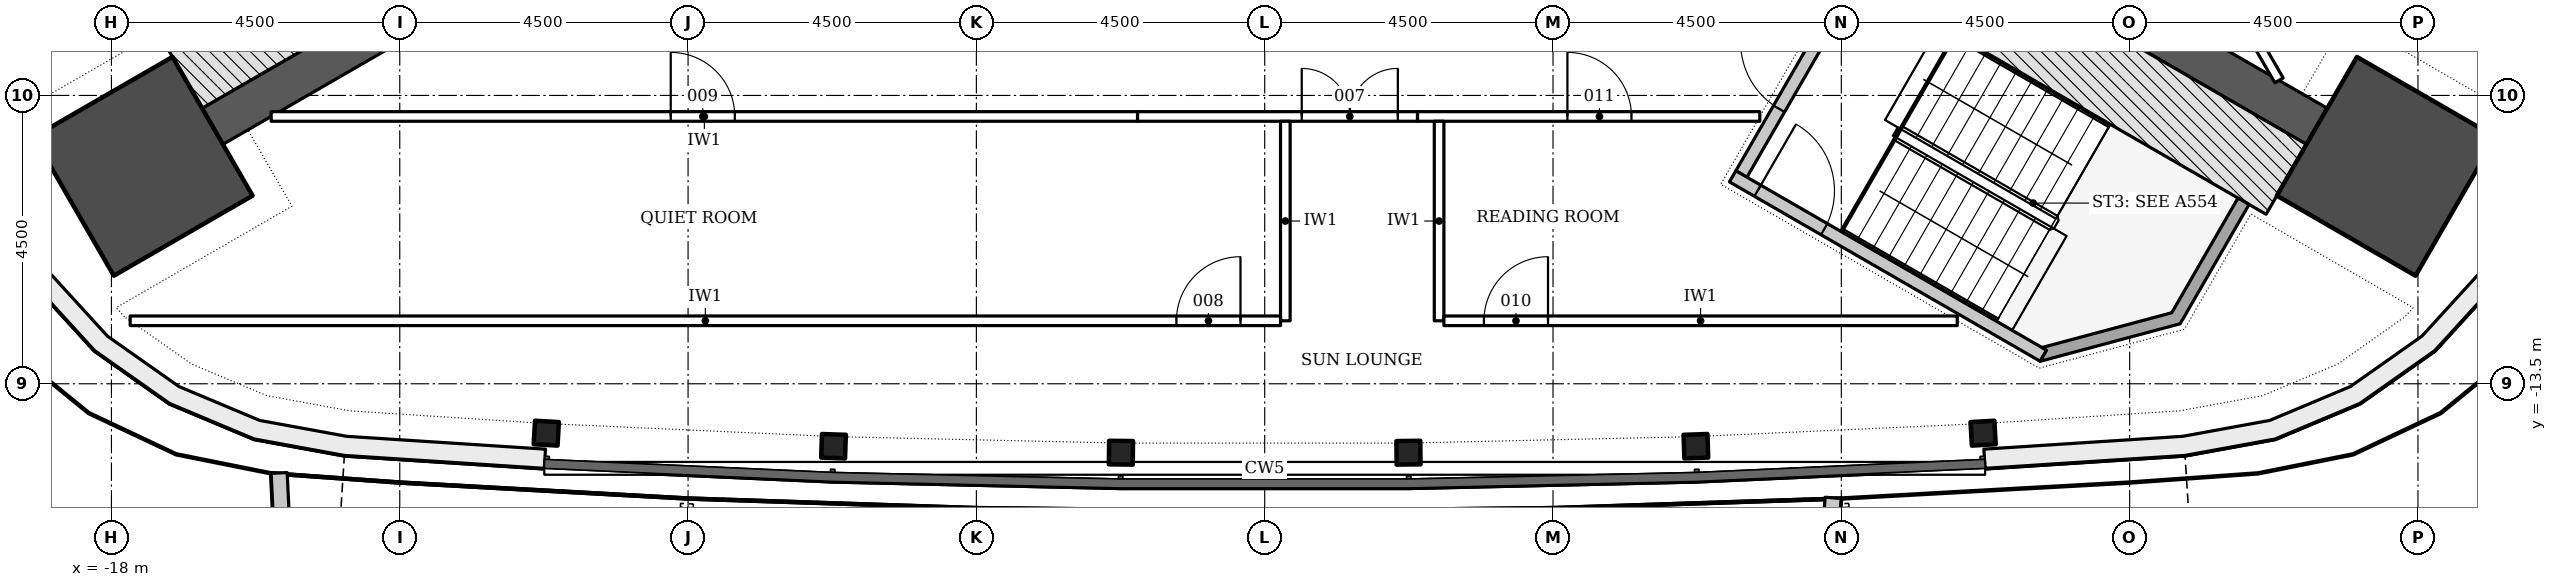
"""IFC4 building model, lengths in metres.
Left out: names, types, materials, properties, quantities, classifications, styles, units other than length and angle.
Written with IfcOpenShell. Run it as: python <this file> out.ifc"""

import sys

from ifc_helpers import new_model, si_unit, direction, frame, frame_2d, origin, origin_2d, place, context, subcontext, project, spatial, polyline, rectangle, i_section, outline, extrude, element, fill, save


model = new_model("IFC4")
c1 = context("Model", 3, precision=1e-05, world=origin(), true_north=direction((0.0, 1.0)))
c2 = subcontext(c1, "Body", "Model", "MODEL_VIEW")
j1 = project(units=[si_unit("LENGTHUNIT", "METRE"), si_unit("PLANEANGLEUNIT", "RADIAN")], contexts=[c1])
p1 = place(None, origin())
s1 = spatial("IfcSite", under=j1, at=p1, CompositionType="ELEMENT")
p2 = place(p1, origin())
s2 = spatial("IfcBuilding", under=s1, at=p2, CompositionType="ELEMENT")
p3 = place(p2, frame((0.0, 0.0, 229.2)))
s3 = spatial("IfcBuildingStorey", under=s2, at=p3, CompositionType="ELEMENT", Elevation=229.2)
for number, where, z_axis, x_axis in (
    (1, (-9.922, -5.728, -0.2), (0.0, 0.0, 1.0), (-0.866, -0.5, 0.0)),
    (2, (9.922, -5.728, -0.2), (0.0, 0.0, 1.0), (0.866, -0.5, 0.0)),
):
    element("IfcWall", number, at=place(p3, frame(where, z_axis=z_axis, x_axis=x_axis)), inside=s3, PredefinedType="SHEAR", context=c2, shape_type="SweptSolid", body=[
        extrude(rectangle(XDim=7.506, YDim=0.65, at=frame_2d((3.753, 0.0))), origin(), (0.0, 0.0, 1.0), 3.6),
    ])
for number, where, z_axis, x_axis in (
    (3, (-17.505, -10.106, -0.2), (0.0, 0.0, 1.0), (-0.866, -0.5, 0.0)),
    (4, (17.505, -10.106, -0.2), (0.0, 0.0, 1.0), (0.866, -0.5, 0.0)),
):
    element("IfcColumn", number, at=place(p3, frame(where, z_axis=z_axis, x_axis=x_axis)), inside=s3, PredefinedType="COLUMN", context=c2, shape_type="SweptSolid", body=[
        extrude(rectangle(XDim=2.5, YDim=2.5, at=origin_2d()), origin(), (0.0, 0.0, 1.0), 3.6),
    ])
for number, where, z_axis, x_axis in (
    (5, (-11.213, -14.271, -0.2), (0.0, 0.0, 1.0), (0.998, -0.057, 0.0)),
    (6, (-6.73, -14.474, -0.2), (0.0, 0.0, 1.0), (0.999, -0.034, 0.0)),
    (7, (-2.244, -14.576, -0.2), (0.0, 0.0, 1.0), (1.0, -0.011, 0.0)),
    (8, (2.244, -14.576, -0.2), (0.0, 0.0, 1.0), (1.0, 0.011, 0.0)),
    (9, (6.73, -14.474, -0.2), (0.0, 0.0, 1.0), (0.999, 0.034, 0.0)),
    (10, (11.213, -14.271, -0.2), (0.0, 0.0, 1.0), (0.998, 0.057, 0.0)),
):
    element("IfcColumn", number, at=place(p3, frame(where, z_axis=z_axis, x_axis=x_axis)), inside=s3, PredefinedType="COLUMN", context=c2, shape_type="SweptSolid", body=[
        extrude(i_section(OverallWidth=0.373, OverallDepth=0.368, WebThickness=0.015, FlangeThickness=0.024, FilletRadius=0.015, at=origin_2d()), origin(), (0.0, 0.0, 1.0), 3.6),
    ])
p4 = place(p3, origin())
e11 = element("IfcWall", 11, at=p4, inside=s3, PredefinedType="NOTDEFINED", context=c2, shape_type="SweptSolid", body=[
    extrude(outline(polyline([(-18.457, -2.328), (-19.842, -5.13), (-20.323, -6.478), (-20.504, -7.898), (-20.375, -9.323), (-19.942, -10.687), (-19.227, -11.927), (-18.261, -12.983), (-17.092, -13.808), (-15.772, -14.361), (-14.364, -14.619), (-11.244, -14.82), (-11.225, -14.521), (-14.327, -14.32), (-15.686, -14.072), (-16.945, -13.544), (-18.062, -12.757), (-18.983, -11.748), (-19.666, -10.566), (-20.079, -9.264), (-20.202, -7.903), (-20.03, -6.548), (-19.565, -5.248), (-18.188, -2.46), (-18.457, -2.328)])), origin(), (0.0, 0.0, 1.0), 3.3),
])
p5 = place(p3, origin())
e12 = element("IfcWall", 12, at=p5, inside=s3, PredefinedType="NOTDEFINED", context=c2, shape_type="SweptSolid", body=[
    extrude(outline(polyline([(11.244, -14.82), (14.364, -14.619), (15.772, -14.361), (17.092, -13.808), (18.261, -12.983), (19.227, -11.927), (19.942, -10.687), (20.375, -9.323), (20.504, -7.898), (20.323, -6.478), (19.842, -5.13), (18.457, -2.328), (18.188, -2.46), (19.565, -5.248), (20.03, -6.548), (20.202, -7.903), (20.079, -9.264), (19.666, -10.566), (18.983, -11.748), (18.062, -12.757), (16.945, -13.544), (15.686, -14.072), (14.327, -14.32), (11.225, -14.521), (11.244, -14.82)])), origin(), (0.0, 0.0, 1.0), 3.3),
])
p6 = place(p3, origin())
e13 = element("IfcWall", 13, at=p6, inside=s3, PredefinedType="PARAPET", context=c2, shape_type="SweptSolid", body=[
    extrude(outline(polyline([(-15.507, -14.898), (-15.367, -17.766), (-14.859, -20.553), (-13.998, -23.174), (-12.811, -25.549), (-11.333, -27.606), (-9.61, -29.284), (-7.694, -30.531), (-5.643, -31.308), (-3.52, -31.593), (-1.388, -31.376), (0.687, -30.665), (2.642, -29.481), (4.418, -27.859), (5.96, -25.85), (7.223, -23.514), (8.168, -20.922), (8.765, -18.153), (8.997, -15.291), (8.748, -15.271), (8.517, -18.116), (7.927, -20.853), (6.995, -23.411), (5.75, -25.714), (4.233, -27.689), (2.491, -29.28), (0.58, -30.437), (-1.442, -31.13), (-3.516, -31.341), (-5.582, -31.064), (-7.581, -30.306), (-9.454, -29.088), (-11.143, -27.443), (-12.596, -25.419), (-13.766, -23.078), (-14.616, -20.491), (-15.118, -17.737), (-15.258, -14.886), (-15.507, -14.898)])), origin(), (0.0, 0.0, 1.0), 1.1),
])
p7 = place(p3, frame((-10.399, -4.901, -0.2), z_axis=(0.0, 0.0, 1.0), x_axis=(-0.866020939036, -0.500007733091, 0.0)))
e14 = element("IfcWall", 14, at=p7, inside=s3, PredefinedType="SHEAR", context=c2, shape_type="SweptSolid", body=[
    extrude(rectangle(XDim=7.507, YDim=1.261, at=frame_2d((3.753, 0.0))), origin(), (0.0, 0.0, 1.0), 3.6),
])
p8 = place(p3, frame((7.44, -10.226, -0.2), z_axis=(0.0, 0.0, 1.0), x_axis=(0.500022077904, 0.866012656725, 0.0)))
e15 = element("IfcWall", 15, at=p8, inside=s3, PredefinedType="SHEAR", context=c2, shape_type="SweptSolid", body=[
    extrude(rectangle(XDim=3.55, YDim=0.2, at=frame_2d((1.775, 0.0))), origin(), (0.0, 0.0, 1.0), 3.6),
])
p9 = place(p8, frame((1.175, 0.0, 0.2)))
e16 = element("IfcOpeningElement", 16, at=p9, cuts=e15, PredefinedType="OPENING", context=c2, shape_type="SweptSolid", body=[
    extrude(rectangle(XDim=1.2, YDim=2.1, at=frame_2d((0.6, 1.05))), frame((0.0, 0.11, 0.0), z_axis=(0.0, -1.0, 0.0), x_axis=(1.0, 0.0, 0.0)), (0.0, 0.0, 1.0), 0.22),
])
p10 = place(p3, frame((7.304, -10.262, -0.2), z_axis=(0.0, 0.0, 1.0), x_axis=(0.866026594901, -0.49999793692, 0.0)))
e17 = element("IfcWall", 17, at=p10, inside=s3, PredefinedType="SHEAR", context=c2, shape_type="SweptSolid", body=[
    extrude(rectangle(XDim=5.6, YDim=0.2, at=frame_2d((2.8, 0.0))), origin(), (0.0, 0.0, 1.0), 3.6),
])
p11 = place(p10, frame((0.45, 0.0, 0.2)))
e18 = element("IfcOpeningElement", 18, at=p11, cuts=e17, PredefinedType="OPENING", context=c2, shape_type="SweptSolid", body=[
    extrude(rectangle(XDim=1.2, YDim=2.1, at=frame_2d((0.6, 1.05))), frame((0.0, 0.11, 0.0), z_axis=(0.0, -1.0, 0.0), x_axis=(1.0, 0.0, 0.0)), (0.0, 0.0, 1.0), 0.22),
])
p12 = place(p3, frame((9.444, -6.555, -0.2), z_axis=(0.0, 0.0, 1.0), x_axis=(0.866020939036, -0.500007733091, 0.0)))
e19 = element("IfcWall", 19, at=p12, inside=s3, PredefinedType="SHEAR", context=c2, shape_type="SweptSolid", body=[
    extrude(rectangle(XDim=7.507, YDim=1.261, at=frame_2d((3.753, 0.0))), origin(), (0.0, 0.0, 1.0), 3.6),
])
p13 = place(p3, frame((0.0, 0.0, -0.2)))
e20 = element("IfcWall", 20, at=p13, inside=s3, PredefinedType="SHEAR", context=c2, shape_type="SweptSolid", body=[
    extrude(outline(polyline([(12.104, -13.149), (14.289, -12.563), (15.364, -10.701), (15.191, -10.601), (14.157, -12.392), (12.132, -12.934), (12.204, -12.976), (12.204, -12.976), (12.204, -12.976), (12.204, -12.976), (12.204, -12.976), (12.204, -12.976), (12.204, -12.976), (12.204, -12.976), (12.204, -12.976), (12.204, -12.976), (12.204, -12.976), (12.204, -12.976), (12.204, -12.976), (12.204, -12.976), (12.204, -12.976), (12.204, -12.976), (12.204, -12.976), (12.104, -13.149)])), origin(), (0.0, 0.0, 1.0), 3.6),
])
p14 = place(p3, frame((15.832, -8.765, 0.0), z_axis=(0.0, 0.0, 1.0), x_axis=(-0.500008967739, 0.866020226196, 0.0)))
e21 = element("IfcWall", 21, at=p14, inside=s3, PredefinedType="PARTITIONING", context=c2, shape_type="SweptSolid", body=[
    extrude(rectangle(XDim=13.523, YDim=0.15, at=frame_2d((6.761, 0.0))), origin(), (0.0, 0.0, 1.0), 2.852),
])
p15 = place(p3, frame((-15.507, -9.328, 0.0), z_axis=(0.0, 0.0, 1.0), x_axis=(1.0, 0.0, 0.0)))
e22 = element("IfcWall", 22, at=p15, inside=s3, PredefinedType="PARTITIONING", context=c2, shape_type="SweptSolid", body=[
    extrude(rectangle(XDim=13.522, YDim=0.15, at=frame_2d((6.761, 0.0))), origin(), (0.0, 0.0, 1.0), 2.852),
])
p16 = place(p15, frame((6.236, 0.0, 0.0)))
e23 = element("IfcOpeningElement", 23, at=p16, cuts=e22, PredefinedType="OPENING", context=c2, shape_type="SweptSolid", body=[
    extrude(rectangle(XDim=1.0, YDim=2.1, at=frame_2d((0.5, 1.05))), frame((0.0, 0.085, 0.0), z_axis=(0.0, -1.0, 0.0), x_axis=(1.0, 0.0, 0.0)), (0.0, 0.0, 1.0), 0.17),
])
p17 = place(p3, frame((2.384, -9.328, 0.0), z_axis=(0.0, 0.0, 1.0), x_axis=(1.0, 0.0, 0.0)))
e24 = element("IfcWall", 24, at=p17, inside=s3, PredefinedType="PARTITIONING", context=c2, shape_type="SweptSolid", body=[
    extrude(rectangle(XDim=5.343, YDim=0.15, at=frame_2d((2.672, 0.0))), origin(), (0.0, 0.0, 1.0), 2.852),
])
p18 = place(p17, frame((2.341, 0.0, 0.0)))
e25 = element("IfcOpeningElement", 25, at=p18, cuts=e24, PredefinedType="OPENING", context=c2, shape_type="SweptSolid", body=[
    extrude(rectangle(XDim=1.0, YDim=2.1, at=frame_2d((0.5, 1.05))), frame((0.0, 0.085, 0.0), z_axis=(0.0, -1.0, 0.0), x_axis=(1.0, 0.0, 0.0)), (0.0, 0.0, 1.0), 0.17),
])
p19 = place(p3, frame((-1.984, -9.328, 0.0), z_axis=(0.0, 0.0, 1.0), x_axis=(1.0, 0.0, 0.0)))
e26 = element("IfcWall", 26, at=p19, inside=s3, PredefinedType="PARTITIONING", context=c2, shape_type="SweptSolid", body=[
    extrude(rectangle(XDim=4.369, YDim=0.15, at=frame_2d((2.184, 0.0))), origin(), (0.0, 0.0, 1.0), 2.852),
])
p20 = place(p19, frame((2.562, 0.0, 0.0)))
e27 = element("IfcOpeningElement", 27, at=p20, cuts=e26, PredefinedType="OPENING", context=c2, shape_type="SweptSolid", body=[
    extrude(rectangle(XDim=1.5, YDim=2.1, at=frame_2d((0.75, 1.05))), frame((0.0, 0.085, 0.0), z_axis=(0.0, -1.0, 0.0), x_axis=(1.0, 0.0, 0.0)), (0.0, 0.0, 1.0), 0.17),
])
for number, where, z_axis, x_axis in (
    (28, (0.322, -9.403, 0.0), (0.0, 0.0, 1.0), (0.0, -1.0, 0.0)),
    (29, (2.722, -9.403, 0.0), (0.0, 0.0, 1.0), (0.0, -1.0, 0.0)),
):
    element("IfcWall", number, at=place(p3, frame(where, z_axis=z_axis, x_axis=x_axis)), inside=s3, PredefinedType="PARTITIONING", context=c2, shape_type="SweptSolid", body=[
        extrude(rectangle(XDim=3.114, YDim=0.15, at=frame_2d((1.557, 0.0))), origin(), (0.0, 0.0, 1.0), 3.4),
    ])
p21 = place(p3, frame((-17.708, -12.517, 0.0), z_axis=(0.0, 0.0, 1.0), x_axis=(1.0, 0.0, 0.0)))
e30 = element("IfcWall", 30, at=p21, inside=s3, PredefinedType="PARTITIONING", context=c2, shape_type="SweptSolid", body=[
    extrude(rectangle(XDim=17.955, YDim=0.15, at=frame_2d((8.978, 0.0))), origin(), (0.0, 0.0, 1.0), 2.852),
])
p22 = place(p21, frame((16.33, 0.0, 0.0)))
e31 = element("IfcOpeningElement", 31, at=p22, cuts=e30, PredefinedType="OPENING", context=c2, shape_type="SweptSolid", body=[
    extrude(rectangle(XDim=1.0, YDim=2.1, at=frame_2d((0.5, 1.05))), frame((0.0, 0.085, 0.0), z_axis=(0.0, -1.0, 0.0), x_axis=(1.0, 0.0, 0.0)), (0.0, 0.0, 1.0), 0.17),
])
p23 = place(p3, frame((2.797, -12.517, 0.0), z_axis=(0.0, 0.0, 1.0), x_axis=(1.0, 0.0, 0.0)))
e32 = element("IfcWall", 32, at=p23, inside=s3, PredefinedType="PARTITIONING", context=c2, shape_type="SweptSolid", body=[
    extrude(rectangle(XDim=8.012, YDim=0.15, at=frame_2d((4.006, 0.0))), origin(), (0.0, 0.0, 1.0), 2.852),
])
p24 = place(p23, frame((0.625, 0.0, 0.0)))
e33 = element("IfcOpeningElement", 33, at=p24, cuts=e32, PredefinedType="OPENING", context=c2, shape_type="SweptSolid", body=[
    extrude(rectangle(XDim=1.0, YDim=2.1, at=frame_2d((0.5, 1.05))), frame((0.0, 0.085, 0.0), z_axis=(0.0, -1.0, 0.0), x_axis=(1.0, 0.0, 0.0)), (0.0, 0.0, 1.0), 0.17),
])
p25 = place(p9, origin())
e34 = element("IfcDoor", 34, at=p25, inside=s3, OperationType="SINGLE_SWING_RIGHT", PredefinedType="DOOR", context=c2, shape_type="SweptSolid", body=[
    extrude(rectangle(XDim=1.2, YDim=2.1, at=frame_2d((0.6, 1.05))), frame((0.0, 0.025, 0.0), z_axis=(0.0, -1.0, 0.0), x_axis=(1.0, 0.0, 0.0)), (0.0, 0.0, 1.0), 0.05),
])
fill(e16, e34)
p26 = place(p11, origin())
e35 = element("IfcDoor", 35, at=p26, inside=s3, OperationType="SINGLE_SWING_LEFT", PredefinedType="DOOR", context=c2, shape_type="SweptSolid", body=[
    extrude(rectangle(XDim=1.2, YDim=2.1, at=frame_2d((0.6, 1.05))), frame((0.0, 0.025, 0.0), z_axis=(0.0, -1.0, 0.0), x_axis=(1.0, 0.0, 0.0)), (0.0, 0.0, 1.0), 0.05),
])
fill(e18, e35)
p27 = place(p20, origin())
e36 = element("IfcDoor", 36, at=p27, inside=s3, OperationType="DOUBLE_DOOR_SINGLE_SWING", PredefinedType="DOOR", context=c2, shape_type="SweptSolid", body=[
    extrude(rectangle(XDim=1.5, YDim=2.1, at=frame_2d((0.75, 1.05))), frame((0.0, 0.025, 0.0), z_axis=(0.0, -1.0, 0.0), x_axis=(1.0, 0.0, 0.0)), (0.0, 0.0, 1.0), 0.05),
])
fill(e27, e36)
p28 = place(p22, origin())
e37 = element("IfcDoor", 37, at=p28, inside=s3, OperationType="SINGLE_SWING_RIGHT", PredefinedType="DOOR", context=c2, shape_type="SweptSolid", body=[
    extrude(rectangle(XDim=1.0, YDim=2.1, at=frame_2d((0.5, 1.05))), frame((0.0, 0.025, 0.0), z_axis=(0.0, -1.0, 0.0), x_axis=(1.0, 0.0, 0.0)), (0.0, 0.0, 1.0), 0.05),
])
fill(e31, e37)
p29 = place(p16, origin())
e38 = element("IfcDoor", 38, at=p29, inside=s3, OperationType="SINGLE_SWING_LEFT", PredefinedType="DOOR", context=c2, shape_type="SweptSolid", body=[
    extrude(rectangle(XDim=1.0, YDim=2.1, at=frame_2d((0.5, 1.05))), frame((0.0, 0.025, 0.0), z_axis=(0.0, -1.0, 0.0), x_axis=(1.0, 0.0, 0.0)), (0.0, 0.0, 1.0), 0.05),
])
fill(e23, e38)
p30 = place(p24, origin())
e39 = element("IfcDoor", 39, at=p30, inside=s3, OperationType="SINGLE_SWING_RIGHT", PredefinedType="DOOR", context=c2, shape_type="SweptSolid", body=[
    extrude(rectangle(XDim=1.0, YDim=2.1, at=frame_2d((0.5, 1.05))), frame((0.0, 0.025, 0.0), z_axis=(0.0, -1.0, 0.0), x_axis=(1.0, 0.0, 0.0)), (0.0, 0.0, 1.0), 0.05),
])
fill(e33, e39)
p31 = place(p18, origin())
e40 = element("IfcDoor", 40, at=p31, inside=s3, OperationType="SINGLE_SWING_LEFT", PredefinedType="DOOR", context=c2, shape_type="SweptSolid", body=[
    extrude(rectangle(XDim=1.0, YDim=2.1, at=frame_2d((0.5, 1.05))), frame((0.0, 0.025, 0.0), z_axis=(0.0, -1.0, 0.0), x_axis=(1.0, 0.0, 0.0)), (0.0, 0.0, 1.0), 0.05),
])
fill(e25, e40)
save(model, sys.argv[1])
